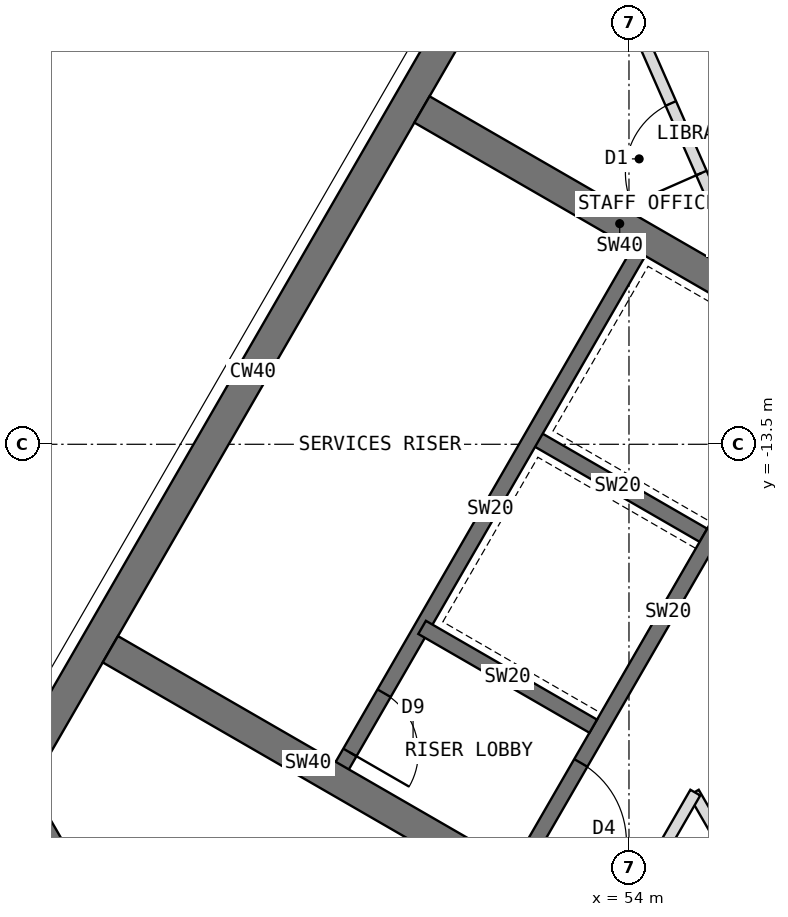
"""IFC4 building model, lengths in metres.
Left out: names, types, materials, properties, quantities, classifications, styles, units other than length and angle.
Written with IfcOpenShell. Run it as: python <this file> out.ifc"""

import sys

from ifc_helpers import new_model, si_unit, direction, frame, frame_2d, origin, place, context, subcontext, project, spatial, rectangle, extrude, element, fill, save


model = new_model("IFC4")
c1 = context("Model", 3, precision=1e-05, world=origin(), true_north=direction((0.0, 1.0)))
c2 = subcontext(c1, "Body", "Model", "MODEL_VIEW")
j1 = project(units=[si_unit("LENGTHUNIT", "METRE"), si_unit("PLANEANGLEUNIT", "RADIAN")], contexts=[c1])
p1 = place(None, origin())
s1 = spatial("IfcSite", under=j1, at=p1, CompositionType="ELEMENT")
p2 = place(p1, origin())
s2 = spatial("IfcBuilding", under=s1, at=p2, CompositionType="ELEMENT")
p3 = place(p2, frame((0.0, 0.0, 247.5)))
s3 = spatial("IfcBuildingStorey", under=s2, at=p3, CompositionType="ELEMENT", Elevation=247.5)
p4 = place(p3, frame((52.202, -7.092, 0.0), z_axis=(0.0, 0.0, 1.0), x_axis=(-0.500005998175, -0.866021940709, 0.0)))
e1 = element("IfcWall", 1, at=p4, inside=s3, PredefinedType="SHEAR", context=c2, shape_type="SweptSolid", body=[
    extrude(rectangle(XDim=12.596, YDim=0.4, at=frame_2d((6.298, 0.0))), origin(), (0.0, 0.0, 1.0), 4.0),
])
p5 = place(p3, frame((45.904, -18.0, 0.0), z_axis=(0.0, 0.0, 1.0), x_axis=(0.500024481964, -0.866011268655, 0.0)))
e2 = element("IfcWall", 2, at=p5, inside=s3, PredefinedType="SHEAR", context=c2, shape_type="SweptSolid", body=[
    extrude(rectangle(XDim=4.548, YDim=0.4, at=frame_2d((2.274, 0.0))), origin(), (0.0, 0.0, 1.0), 4.0),
])
p6 = place(p3, frame((56.516, -12.236, 0.0), z_axis=(0.0, 0.0, 1.0), x_axis=(-0.49999894854, -0.866026010844, 0.0)))
e3 = element("IfcWall", 3, at=p6, inside=s3, PredefinedType="SHEAR", context=c2, shape_type="SweptSolid", body=[
    extrude(rectangle(XDim=8.0, YDim=0.2, at=frame_2d((4.0, 0.0))), origin(), (0.0, 0.0, 1.0), 4.0),
])
p7 = place(p6, frame((6.3, 0.0, 0.0)))
e4 = element("IfcOpeningElement", 4, at=p7, cuts=e3, PredefinedType="OPENING", context=c2, shape_type="SweptSolid", body=[
    extrude(rectangle(XDim=1.2, YDim=2.1, at=frame_2d((0.6, 1.05))), frame((0.0, 0.11, 0.0), z_axis=(0.0, -1.0, 0.0), x_axis=(1.0, 0.0, 0.0)), (0.0, 0.0, 1.0), 0.22),
])
for number, where, z_axis, x_axis in (
    (5, (54.98, -14.697, 0.0), (0.0, 0.0, 1.0), (-0.866, 0.5, 0.0)),
    (6, (53.53, -17.209, 0.0), (0.0, 0.0, 1.0), (-0.866, 0.5, 0.0)),
):
    element("IfcWall", number, at=place(p3, frame(where, z_axis=z_axis, x_axis=x_axis)), inside=s3, PredefinedType="SHEAR", context=c2, shape_type="SweptSolid", body=[
        extrude(rectangle(XDim=2.6, YDim=0.2, at=frame_2d((1.3, 0.0))), origin(), (0.0, 0.0, 1.0), 4.0),
    ])
p8 = place(p3, frame((54.178, -10.886, 0.0), z_axis=(0.0, 0.0, 1.0), x_axis=(-0.49999894854, -0.866026010844, 0.0)))
e7 = element("IfcWall", 7, at=p8, inside=s3, PredefinedType="SHEAR", context=c2, shape_type="SweptSolid", body=[
    extrude(rectangle(XDim=8.0, YDim=0.2, at=frame_2d((4.0, 0.0))), origin(), (0.0, 0.0, 1.0), 4.0),
])
p9 = place(p8, frame((6.8, 0.0, 0.0)))
e8 = element("IfcOpeningElement", 8, at=p9, cuts=e7, PredefinedType="OPENING", context=c2, shape_type="SweptSolid", body=[
    extrude(rectangle(XDim=0.9, YDim=2.1, at=frame_2d((0.45, 1.05))), frame((0.0, 0.11, 0.0), z_axis=(0.0, -1.0, 0.0), x_axis=(1.0, 0.0, 0.0)), (0.0, 0.0, 1.0), 0.22),
])
for number, where, z_axis, x_axis in (
    (9, (52.38, -19.201, 0.0), (0.0, 0.0, 1.0), (-0.866, 0.5, 0.0)),
    (10, (56.48, -12.099, 0.0), (0.0, 0.0, 1.0), (-0.866, 0.5, 0.0)),
):
    element("IfcWall", number, at=place(p3, frame(where, z_axis=z_axis, x_axis=x_axis)), inside=s3, PredefinedType="SHEAR", context=c2, shape_type="SweptSolid", body=[
        extrude(rectangle(XDim=6.008, YDim=0.4, at=frame_2d((3.004, 0.0))), origin(), (0.0, 0.0, 1.0), 4.0),
    ])
p10 = place(p3, frame((55.955, -19.992, 0.0), z_axis=(0.0, 0.0, 1.0), x_axis=(-0.499914148034, 0.866074964767, 0.0)))
e11 = element("IfcWall", 11, at=p10, inside=s3, PredefinedType="PARTITIONING", context=c2, shape_type="SweptSolid", body=[
    extrude(rectangle(XDim=2.205, YDim=0.15, at=frame_2d((1.103, 0.0))), origin(), (0.0, 0.0, 1.0), 3.8),
])
p11 = place(p3, frame((54.873, -18.083, 0.0), z_axis=(0.0, 0.0, 1.0), x_axis=(-0.500005864412, -0.866022017938, 0.0)))
e12 = element("IfcWall", 12, at=p11, inside=s3, PredefinedType="PARTITIONING", context=c2, shape_type="SweptSolid", body=[
    extrude(rectangle(XDim=2.635, YDim=0.15, at=frame_2d((1.317, 0.0))), origin(), (0.0, 0.0, 1.0), 3.8),
])
p12 = place(p3, frame((55.711, -11.656, 0.0), z_axis=(0.0, 0.0, 1.0), x_axis=(-0.402457111937, 0.915438841787, 0.0)))
e13 = element("IfcWall", 13, at=p12, inside=s3, PredefinedType="PARTITIONING", context=c2, shape_type="SweptSolid", body=[
    extrude(rectangle(XDim=4.767, YDim=0.15, at=frame_2d((2.383, 0.0))), origin(), (0.0, 0.0, 1.0), 3.8),
])
p13 = place(p12, frame((1.883, 0.0, 0.0)))
e14 = element("IfcOpeningElement", 14, at=p13, cuts=e13, PredefinedType="OPENING", context=c2, shape_type="SweptSolid", body=[
    extrude(rectangle(XDim=1.0, YDim=2.1, at=frame_2d((0.5, 1.05))), frame((0.0, 0.085, 0.0), z_axis=(0.0, -1.0, 0.0), x_axis=(1.0, 0.0, 0.0)), (0.0, 0.0, 1.0), 0.17),
])
p14 = place(p7, origin())
e15 = element("IfcDoor", 15, at=p14, inside=s3, OperationType="SINGLE_SWING_RIGHT", PredefinedType="DOOR", context=c2, shape_type="SweptSolid", body=[
    extrude(rectangle(XDim=1.2, YDim=2.1, at=frame_2d((0.6, 1.05))), frame((0.0, 0.025, 0.0), z_axis=(0.0, -1.0, 0.0), x_axis=(1.0, 0.0, 0.0)), (0.0, 0.0, 1.0), 0.05),
])
fill(e4, e15)
p15 = place(p9, origin())
e16 = element("IfcDoor", 16, at=p15, inside=s3, OperationType="SINGLE_SWING_RIGHT", PredefinedType="DOOR", context=c2, shape_type="SweptSolid", body=[
    extrude(rectangle(XDim=0.9, YDim=2.1, at=frame_2d((0.45, 1.05))), frame((0.0, 0.025, 0.0), z_axis=(0.0, -1.0, 0.0), x_axis=(1.0, 0.0, 0.0)), (0.0, 0.0, 1.0), 0.05),
])
fill(e8, e16)
p16 = place(p13, origin())
e17 = element("IfcDoor", 17, at=p16, inside=s3, OperationType="SINGLE_SWING_LEFT", PredefinedType="DOOR", context=c2, shape_type="SweptSolid", body=[
    extrude(rectangle(XDim=1.0, YDim=2.1, at=frame_2d((0.5, 1.05))), frame((0.0, 0.025, 0.0), z_axis=(0.0, -1.0, 0.0), x_axis=(1.0, 0.0, 0.0)), (0.0, 0.0, 1.0), 0.05),
])
fill(e14, e17)
save(model, sys.argv[1])
